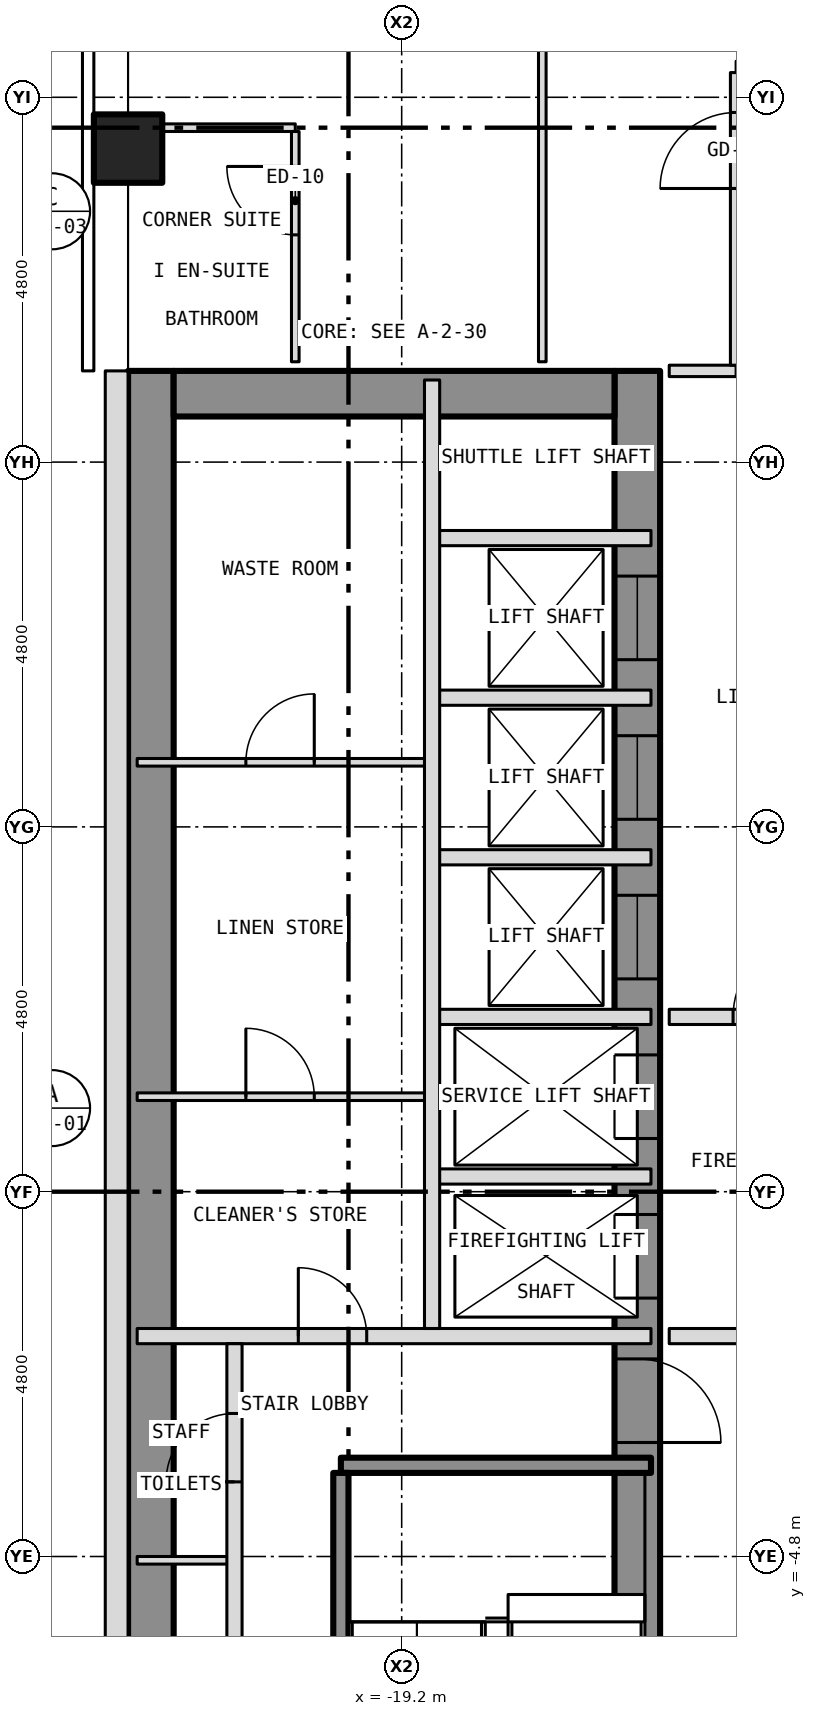
"""IFC4 building model, lengths in metres.
Left out: names, types, materials, properties, quantities, classifications, styles, units other than length and angle.
Written with IfcOpenShell. Run it as: python <this file> out.ifc"""

import sys

from ifc_helpers import new_model, si_unit, direction, frame, frame_2d, origin, origin_2d, place, context, subcontext, project, spatial, rectangle, hollow_rectangle, extrude, element, fill, save


model = new_model("IFC4")
c1 = context("Model", 3, precision=1e-05, world=origin(), true_north=direction((0.0, 1.0)))
c2 = subcontext(c1, "Body", "Model", "MODEL_VIEW")
j1 = project(units=[si_unit("LENGTHUNIT", "METRE"), si_unit("PLANEANGLEUNIT", "RADIAN")], contexts=[c1])
p1 = place(None, origin())
s1 = spatial("IfcSite", under=j1, at=p1, CompositionType="ELEMENT")
p2 = place(p1, origin())
s2 = spatial("IfcBuilding", under=s1, at=p2, CompositionType="ELEMENT")
p3 = place(p2, frame((0.0, 0.0, 110.0)))
s3 = spatial("IfcBuildingStorey", under=s2, at=p3, CompositionType="ELEMENT", Elevation=110.0)
p4 = place(p3, frame((-22.8, 13.725, -0.15), z_axis=(0.0, 0.0, 1.0), x_axis=(1.0, 0.0, 0.0)))
e1 = element("IfcColumn", 1, at=p4, inside=s3, PredefinedType="COLUMN", context=c2, shape_type="SweptSolid", body=[
    extrude(hollow_rectangle(XDim=0.9, YDim=0.9, WallThickness=0.05, at=origin_2d()), origin(), (0.0, 0.0, 1.0), 3.5),
])
p5 = place(p3, frame((-16.1, -10.8, 0.0), z_axis=(0.0, 0.0, 1.0), x_axis=(0.0, 1.0, 0.0)))
e2 = element("IfcWall", 2, at=p5, inside=s3, PredefinedType="SHEAR", context=c2, shape_type="SweptSolid", body=[
    extrude(rectangle(XDim=21.6, YDim=0.6, at=frame_2d((10.8, 0.0))), origin(), (0.0, 0.0, 1.0), 3.25),
])
p6 = place(p5, frame((9.4, 0.0, 0.0)))
e3 = element("IfcOpeningElement", 3, at=p6, cuts=e2, PredefinedType="OPENING", context=c2, shape_type="SweptSolid", body=[
    extrude(rectangle(XDim=1.1, YDim=2.1, at=frame_2d((0.55, 1.05))), frame((0.0, 0.312, 0.0), z_axis=(0.0, -1.0, 0.0), x_axis=(1.0, 0.0, 0.0)), (0.0, 0.0, 1.0), 0.624),
])
p7 = place(p5, frame((11.5, 0.0, 0.0)))
e4 = element("IfcOpeningElement", 4, at=p7, cuts=e2, PredefinedType="OPENING", context=c2, shape_type="SweptSolid", body=[
    extrude(rectangle(XDim=1.1, YDim=2.1, at=frame_2d((0.55, 1.05))), frame((0.0, 0.312, 0.0), z_axis=(0.0, -1.0, 0.0), x_axis=(1.0, 0.0, 0.0)), (0.0, 0.0, 1.0), 0.624),
])
p8 = place(p5, frame((13.6, 0.0, 0.0)))
e5 = element("IfcOpeningElement", 5, at=p8, cuts=e2, PredefinedType="OPENING", context=c2, shape_type="SweptSolid", body=[
    extrude(rectangle(XDim=1.1, YDim=2.1, at=frame_2d((0.55, 1.05))), frame((0.0, 0.312, 0.0), z_axis=(0.0, -1.0, 0.0), x_axis=(1.0, 0.0, 0.0)), (0.0, 0.0, 1.0), 0.624),
])
p9 = place(p5, frame((15.7, 0.0, 0.0)))
e6 = element("IfcOpeningElement", 6, at=p9, cuts=e2, PredefinedType="OPENING", context=c2, shape_type="SweptSolid", body=[
    extrude(rectangle(XDim=1.1, YDim=2.1, at=frame_2d((0.55, 1.05))), frame((0.0, 0.312, 0.0), z_axis=(0.0, -1.0, 0.0), x_axis=(1.0, 0.0, 0.0)), (0.0, 0.0, 1.0), 0.624),
])
p10 = place(p5, frame((17.8, 0.0, 0.0)))
e7 = element("IfcOpeningElement", 7, at=p10, cuts=e2, PredefinedType="OPENING", context=c2, shape_type="SweptSolid", body=[
    extrude(rectangle(XDim=1.1, YDim=2.1, at=frame_2d((0.55, 1.05))), frame((0.0, 0.312, 0.0), z_axis=(0.0, -1.0, 0.0), x_axis=(1.0, 0.0, 0.0)), (0.0, 0.0, 1.0), 0.624),
])
p11 = place(p5, frame((0.758, 0.0, 0.0)))
e8 = element("IfcOpeningElement", 8, at=p11, cuts=e2, PredefinedType="OPENING", context=c2, shape_type="SweptSolid", body=[
    extrude(rectangle(XDim=1.1, YDim=2.1, at=frame_2d((0.55, 1.05))), frame((0.0, 0.312, 0.0), z_axis=(0.0, -1.0, 0.0), x_axis=(1.0, 0.0, 0.0)), (0.0, 0.0, 1.0), 0.624),
])
p12 = place(p5, frame((7.5, 0.0, 0.0)))
e9 = element("IfcOpeningElement", 9, at=p12, cuts=e2, PredefinedType="OPENING", context=c2, shape_type="SweptSolid", body=[
    extrude(rectangle(XDim=1.1, YDim=2.1, at=frame_2d((0.55, 1.05))), frame((0.0, 0.312, 0.0), z_axis=(0.0, -1.0, 0.0), x_axis=(1.0, 0.0, 0.0)), (0.0, 0.0, 1.0), 0.624),
])
p13 = place(p3, frame((-22.5, -10.8, 0.0), z_axis=(0.0, 0.0, 1.0), x_axis=(0.0, 1.0, 0.0)))
e10 = element("IfcWall", 10, at=p13, inside=s3, PredefinedType="SHEAR", context=c2, shape_type="SweptSolid", body=[
    extrude(rectangle(XDim=21.6, YDim=0.6, at=frame_2d((10.8, 0.0))), origin(), (0.0, 0.0, 1.0), 3.25),
])
p14 = place(p3, frame((-22.2, 10.5, 0.0), z_axis=(0.0, 0.0, 1.0), x_axis=(1.0, 0.0, 0.0)))
e11 = element("IfcWall", 11, at=p14, inside=s3, PredefinedType="SHEAR", context=c2, shape_type="SweptSolid", body=[
    extrude(rectangle(XDim=5.8, YDim=0.6, at=frame_2d((2.9, 0.0))), origin(), (0.0, 0.0, 1.0), 3.25),
])
p15 = place(p3, frame((-22.95, 10.8, 0.0), z_axis=(0.0, 0.0, 1.0), x_axis=(0.0, -1.0, 0.0)))
e12 = element("IfcWall", 12, at=p15, inside=s3, PredefinedType="SOLIDWALL", context=c2, shape_type="SweptSolid", body=[
    extrude(rectangle(XDim=21.6, YDim=0.3, at=frame_2d((10.8, 0.0))), origin(), (0.0, 0.0, 1.0), 3.5),
])
p16 = place(p15, frame((18.05, 0.0, 1.0)))
e13 = element("IfcOpeningElement", 13, at=p16, cuts=e12, PredefinedType="OPENING", context=c2, shape_type="SweptSolid", body=[
    extrude(rectangle(XDim=0.6, YDim=1.5, at=frame_2d((0.3, 0.75))), frame((0.0, 0.162, 0.0), z_axis=(0.0, -1.0, 0.0), x_axis=(1.0, 0.0, 0.0)), (0.0, 0.0, 1.0), 0.324),
])
p17 = place(p3, frame((-22.68, -4.85, 0.0), z_axis=(0.0, 0.0, 1.0), x_axis=(1.0, 0.0, 0.0)))
e14 = element("IfcWall", 14, at=p17, inside=s3, PredefinedType="PARTITIONING", context=c2, shape_type="SweptSolid", body=[
    extrude(rectangle(XDim=1.28, YDim=0.1, at=frame_2d((0.64, 0.0))), origin(), (0.0, 0.0, 1.0), 3.25),
])
p18 = place(p3, frame((-20.0, -3.6, 0.0), z_axis=(0.0, 0.0, 1.0), x_axis=(1.0, 0.0, 0.0)))
e15 = element("IfcWall", 15, at=p18, inside=s3, PredefinedType="SHEAR", context=c2, shape_type="SweptSolid", body=[
    extrude(rectangle(XDim=4.08, YDim=0.2, at=frame_2d((2.04, 0.0))), origin(), (0.0, 0.0, 1.0), 3.25),
])
p19 = place(p3, frame((-22.68, -1.9, 0.0), z_axis=(0.0, 0.0, 1.0), x_axis=(1.0, 0.0, 0.0)))
e16 = element("IfcWall", 16, at=p19, inside=s3, PredefinedType="PARTITIONING", context=c2, shape_type="SweptSolid", body=[
    extrude(rectangle(XDim=6.76, YDim=0.2, at=frame_2d((3.38, 0.0))), origin(), (0.0, 0.0, 1.0), 3.25),
])
p20 = place(p19, frame((2.12, 0.0, 0.0)))
e17 = element("IfcOpeningElement", 17, at=p20, cuts=e16, PredefinedType="OPENING", context=c2, shape_type="SweptSolid", body=[
    extrude(rectangle(XDim=0.9, YDim=2.1, at=frame_2d((0.45, 1.05))), frame((0.0, 0.112, 0.0), z_axis=(0.0, -1.0, 0.0), x_axis=(1.0, 0.0, 0.0)), (0.0, 0.0, 1.0), 0.224),
])
p21 = place(p3, frame((-15.68, -1.9, 0.0), z_axis=(0.0, 0.0, 1.0), x_axis=(1.0, 0.0, 0.0)))
e18 = element("IfcWall", 18, at=p21, inside=s3, PredefinedType="PARTITIONING", context=c2, shape_type="SweptSolid", body=[
    extrude(rectangle(XDim=3.28, YDim=0.2, at=frame_2d((1.64, 0.0))), origin(), (0.0, 0.0, 1.0), 3.35),
])
p22 = place(p21, frame((0.94, 0.0, 0.0)))
e19 = element("IfcOpeningElement", 19, at=p22, cuts=e18, PredefinedType="OPENING", context=c2, shape_type="SweptSolid", body=[
    extrude(rectangle(XDim=1.1, YDim=2.1, at=frame_2d((0.55, 1.05))), frame((0.0, 0.112, 0.0), z_axis=(0.0, -1.0, 0.0), x_axis=(1.0, 0.0, 0.0)), (0.0, 0.0, 1.0), 0.224),
])
p23 = place(p3, frame((-18.8, 0.2, 0.0), z_axis=(0.0, 0.0, 1.0), x_axis=(1.0, 0.0, 0.0)))
e20 = element("IfcWall", 20, at=p23, inside=s3, PredefinedType="PARTITIONING", context=c2, shape_type="SweptSolid", body=[
    extrude(rectangle(XDim=2.88, YDim=0.2, at=frame_2d((1.44, 0.0))), origin(), (0.0, 0.0, 1.0), 3.25),
])
p24 = place(p3, frame((-22.68, 1.25, 0.0), z_axis=(0.0, 0.0, 1.0), x_axis=(1.0, 0.0, 0.0)))
e21 = element("IfcWall", 21, at=p24, inside=s3, PredefinedType="PARTITIONING", context=c2, shape_type="SweptSolid", body=[
    extrude(rectangle(XDim=3.88, YDim=0.1, at=frame_2d((1.94, 0.0))), origin(), (0.0, 0.0, 1.0), 3.25),
])
p25 = place(p24, frame((1.43, 0.0, 0.0)))
e22 = element("IfcOpeningElement", 22, at=p25, cuts=e21, PredefinedType="OPENING", context=c2, shape_type="SweptSolid", body=[
    extrude(rectangle(XDim=0.9, YDim=2.1, at=frame_2d((0.45, 1.05))), frame((0.0, 0.062, 0.0), z_axis=(0.0, -1.0, 0.0), x_axis=(1.0, 0.0, 0.0)), (0.0, 0.0, 1.0), 0.124),
])
p26 = place(p3, frame((-18.8, 2.3, 0.0), z_axis=(0.0, 0.0, 1.0), x_axis=(1.0, 0.0, 0.0)))
e23 = element("IfcWall", 23, at=p26, inside=s3, PredefinedType="PARTITIONING", context=c2, shape_type="SweptSolid", body=[
    extrude(rectangle(XDim=2.88, YDim=0.2, at=frame_2d((1.44, 0.0))), origin(), (0.0, 0.0, 1.0), 3.25),
])
p27 = place(p3, frame((-15.68, 2.3, 0.0), z_axis=(0.0, 0.0, 1.0), x_axis=(1.0, 0.0, 0.0)))
e24 = element("IfcWall", 24, at=p27, inside=s3, PredefinedType="PARTITIONING", context=c2, shape_type="SweptSolid", body=[
    extrude(rectangle(XDim=3.28, YDim=0.2, at=frame_2d((1.64, 0.0))), origin(), (0.0, 0.0, 1.0), 3.35),
])
p28 = place(p27, frame((0.84, 0.0, 0.0)))
e25 = element("IfcOpeningElement", 25, at=p28, cuts=e24, PredefinedType="OPENING", context=c2, shape_type="SweptSolid", body=[
    extrude(rectangle(XDim=1.1, YDim=2.1, at=frame_2d((0.55, 1.05))), frame((0.0, 0.112, 0.0), z_axis=(0.0, -1.0, 0.0), x_axis=(1.0, 0.0, 0.0)), (0.0, 0.0, 1.0), 0.224),
])
p29 = place(p3, frame((-18.8, 4.4, 0.0), z_axis=(0.0, 0.0, 1.0), x_axis=(1.0, 0.0, 0.0)))
e26 = element("IfcWall", 26, at=p29, inside=s3, PredefinedType="PARTITIONING", context=c2, shape_type="SweptSolid", body=[
    extrude(rectangle(XDim=2.88, YDim=0.2, at=frame_2d((1.44, 0.0))), origin(), (0.0, 0.0, 1.0), 3.25),
])
p30 = place(p3, frame((-22.68, 5.65, 0.0), z_axis=(0.0, 0.0, 1.0), x_axis=(1.0, 0.0, 0.0)))
e27 = element("IfcWall", 27, at=p30, inside=s3, PredefinedType="PARTITIONING", context=c2, shape_type="SweptSolid", body=[
    extrude(rectangle(XDim=3.88, YDim=0.1, at=frame_2d((1.94, 0.0))), origin(), (0.0, 0.0, 1.0), 3.25),
])
p31 = place(p30, frame((1.43, 0.0, 0.0)))
e28 = element("IfcOpeningElement", 28, at=p31, cuts=e27, PredefinedType="OPENING", context=c2, shape_type="SweptSolid", body=[
    extrude(rectangle(XDim=0.9, YDim=2.1, at=frame_2d((0.45, 1.05))), frame((0.0, 0.062, 0.0), z_axis=(0.0, -1.0, 0.0), x_axis=(1.0, 0.0, 0.0)), (0.0, 0.0, 1.0), 0.124),
])
for number, where, z_axis, x_axis in (
    (29, (-18.8, 6.5, 0.0), (0.0, 0.0, 1.0), (1.0, 0.0, 0.0)),
    (30, (-18.8, 8.6, 0.0), (0.0, 0.0, 1.0), (1.0, 0.0, 0.0)),
):
    element("IfcWall", number, at=place(p3, frame(where, z_axis=z_axis, x_axis=x_axis)), inside=s3, PredefinedType="PARTITIONING", context=c2, shape_type="SweptSolid", body=[
        extrude(rectangle(XDim=2.88, YDim=0.2, at=frame_2d((1.44, 0.0))), origin(), (0.0, 0.0, 1.0), 3.25),
    ])
p32 = place(p3, frame((-15.68, 10.8, 0.0), z_axis=(0.0, 0.0, 1.0), x_axis=(1.0, 0.0, 0.0)))
e31 = element("IfcWall", 31, at=p32, inside=s3, PredefinedType="PARTITIONING", context=c2, shape_type="SweptSolid", body=[
    extrude(rectangle(XDim=0.88, YDim=0.15, at=frame_2d((0.44, 0.0))), origin(), (0.0, 0.0, 1.0), 3.35),
])
p33 = place(p3, frame((-22.68, 14.0, 0.0), z_axis=(0.0, 0.0, 1.0), x_axis=(1.0, 0.0, 0.0)))
e32 = element("IfcWall", 32, at=p33, inside=s3, PredefinedType="PARTITIONING", context=c2, shape_type="SweptSolid", body=[
    extrude(rectangle(XDim=2.08, YDim=0.1, at=frame_2d((1.04, 0.0))), origin(), (0.0, 0.0, 1.0), 3.35),
])
p34 = place(p3, frame((-21.4, -10.68, 0.0), z_axis=(0.0, 0.0, 1.0), x_axis=(0.0, 1.0, 0.0)))
e33 = element("IfcWall", 33, at=p34, inside=s3, PredefinedType="PARTITIONING", context=c2, shape_type="SweptSolid", body=[
    extrude(rectangle(XDim=8.68, YDim=0.2, at=frame_2d((4.34, 0.0))), origin(), (0.0, 0.0, 1.0), 3.25),
])
p35 = place(p34, frame((0.899, 0.0, 0.0)))
e34 = element("IfcOpeningElement", 34, at=p35, cuts=e33, PredefinedType="OPENING", context=c2, shape_type="SweptSolid", body=[
    extrude(rectangle(XDim=0.9, YDim=2.1, at=frame_2d((0.45, 1.05))), frame((0.0, 0.112, 0.0), z_axis=(0.0, -1.0, 0.0), x_axis=(1.0, 0.0, 0.0)), (0.0, 0.0, 1.0), 0.224),
])
p36 = place(p34, frame((3.88, 0.0, 0.0)))
e35 = element("IfcOpeningElement", 35, at=p36, cuts=e33, PredefinedType="OPENING", context=c2, shape_type="SweptSolid", body=[
    extrude(rectangle(XDim=0.9, YDim=2.1, at=frame_2d((0.45, 1.05))), frame((0.0, 0.112, 0.0), z_axis=(0.0, -1.0, 0.0), x_axis=(1.0, 0.0, 0.0)), (0.0, 0.0, 1.0), 0.224),
])
p37 = place(p34, frame((6.862, 0.0, 0.0)))
e36 = element("IfcOpeningElement", 36, at=p37, cuts=e33, PredefinedType="OPENING", context=c2, shape_type="SweptSolid", body=[
    extrude(rectangle(XDim=0.9, YDim=2.1, at=frame_2d((0.45, 1.05))), frame((0.0, 0.112, 0.0), z_axis=(0.0, -1.0, 0.0), x_axis=(1.0, 0.0, 0.0)), (0.0, 0.0, 1.0), 0.224),
])
p38 = place(p3, frame((-20.6, 10.92, 0.0), z_axis=(0.0, 0.0, 1.0), x_axis=(0.0, 1.0, 0.0)))
e37 = element("IfcWall", 37, at=p38, inside=s3, PredefinedType="PARTITIONING", context=c2, shape_type="SweptSolid", body=[
    extrude(rectangle(XDim=3.03, YDim=0.1, at=frame_2d((1.515, 0.0))), origin(), (0.0, 0.0, 1.0), 3.35),
])
p39 = place(p38, frame((1.67, 0.0, 0.0)))
e38 = element("IfcOpeningElement", 38, at=p39, cuts=e37, PredefinedType="OPENING", context=c2, shape_type="SweptSolid", body=[
    extrude(rectangle(XDim=0.9, YDim=2.1, at=frame_2d((0.45, 1.05))), frame((0.0, 0.062, 0.0), z_axis=(0.0, -1.0, 0.0), x_axis=(1.0, 0.0, 0.0)), (0.0, 0.0, 1.0), 0.124),
])
p40 = place(p3, frame((-20.0, -10.68, 0.0), z_axis=(0.0, 0.0, 1.0), x_axis=(0.0, 1.0, 0.0)))
e39 = element("IfcWall", 39, at=p40, inside=s3, PredefinedType="SHEAR", context=c2, shape_type="SweptSolid", body=[
    extrude(rectangle(XDim=6.98, YDim=0.2, at=frame_2d((3.49, 0.0))), origin(), (0.0, 0.0, 1.0), 3.25),
])
p41 = place(p3, frame((-18.8, -1.8, 0.0), z_axis=(0.0, 0.0, 1.0), x_axis=(0.0, 1.0, 0.0)))
e40 = element("IfcWall", 40, at=p41, inside=s3, PredefinedType="PARTITIONING", context=c2, shape_type="SweptSolid", body=[
    extrude(rectangle(XDim=12.48, YDim=0.2, at=frame_2d((6.24, 0.0))), origin(), (0.0, 0.0, 1.0), 3.25),
])
p42 = place(p3, frame((-17.35, 10.92, 0.0), z_axis=(0.0, 0.0, 1.0), x_axis=(0.0, 1.0, 0.0)))
e41 = element("IfcWall", 41, at=p42, inside=s3, PredefinedType="PARTITIONING", context=c2, shape_type="SweptSolid", body=[
    extrude(rectangle(XDim=12.36, YDim=0.1, at=frame_2d((6.18, 0.0))), origin(), (0.0, 0.0, 1.0), 3.35),
])
p43 = place(p42, frame((5.43, 0.0, 0.0)))
e42 = element("IfcOpeningElement", 42, at=p43, cuts=e41, PredefinedType="OPENING", context=c2, shape_type="SweptSolid", body=[
    extrude(rectangle(XDim=0.9, YDim=2.1, at=frame_2d((0.45, 1.05))), frame((0.0, 0.062, 0.0), z_axis=(0.0, -1.0, 0.0), x_axis=(1.0, 0.0, 0.0)), (0.0, 0.0, 1.0), 0.124),
])
p44 = place(p3, frame((-14.8, 10.875, 0.0), z_axis=(0.0, 0.0, 1.0), x_axis=(0.0, 1.0, 0.0)))
e43 = element("IfcWall", 43, at=p44, inside=s3, PredefinedType="PARTITIONING", context=c2, shape_type="SweptSolid", body=[
    extrude(rectangle(XDim=3.85, YDim=0.15, at=frame_2d((1.925, 0.0))), origin(), (0.0, 0.0, 1.0), 3.35),
])
p45 = place(p44, frame((2.325, 0.0, 0.0)))
e44 = element("IfcOpeningElement", 44, at=p45, cuts=e43, PredefinedType="OPENING", context=c2, shape_type="SweptSolid", body=[
    extrude(rectangle(XDim=1.0, YDim=2.1, at=frame_2d((0.5, 1.05))), frame((0.0, 0.087, 0.0), z_axis=(0.0, -1.0, 0.0), x_axis=(1.0, 0.0, 0.0)), (0.0, 0.0, 1.0), 0.174),
])
p46 = place(p6, origin())
e45 = element("IfcDoor", 45, at=p46, inside=s3, OperationType="SLIDING_TO_LEFT", PredefinedType="DOOR", context=c2, shape_type="SweptSolid", body=[
    extrude(rectangle(XDim=1.1, YDim=2.1, at=frame_2d((0.55, 1.05))), frame((0.0, 0.025, 0.0), z_axis=(0.0, -1.0, 0.0), x_axis=(1.0, 0.0, 0.0)), (0.0, 0.0, 1.0), 0.05),
])
fill(e3, e45)
p47 = place(p7, origin())
e46 = element("IfcDoor", 46, at=p47, inside=s3, OperationType="SLIDING_TO_LEFT", PredefinedType="DOOR", context=c2, shape_type="SweptSolid", body=[
    extrude(rectangle(XDim=1.1, YDim=2.1, at=frame_2d((0.55, 1.05))), frame((0.0, 0.025, 0.0), z_axis=(0.0, -1.0, 0.0), x_axis=(1.0, 0.0, 0.0)), (0.0, 0.0, 1.0), 0.05),
])
fill(e4, e46)
p48 = place(p8, origin())
e47 = element("IfcDoor", 47, at=p48, inside=s3, OperationType="SLIDING_TO_LEFT", PredefinedType="DOOR", context=c2, shape_type="SweptSolid", body=[
    extrude(rectangle(XDim=1.1, YDim=2.1, at=frame_2d((0.55, 1.05))), frame((0.0, 0.025, 0.0), z_axis=(0.0, -1.0, 0.0), x_axis=(1.0, 0.0, 0.0)), (0.0, 0.0, 1.0), 0.05),
])
fill(e5, e47)
p49 = place(p9, origin())
e48 = element("IfcDoor", 48, at=p49, inside=s3, OperationType="SLIDING_TO_LEFT", PredefinedType="DOOR", context=c2, shape_type="SweptSolid", body=[
    extrude(rectangle(XDim=1.1, YDim=2.1, at=frame_2d((0.55, 1.05))), frame((0.0, 0.025, 0.0), z_axis=(0.0, -1.0, 0.0), x_axis=(1.0, 0.0, 0.0)), (0.0, 0.0, 1.0), 0.05),
])
fill(e6, e48)
p50 = place(p10, origin())
e49 = element("IfcDoor", 49, at=p50, inside=s3, OperationType="SLIDING_TO_LEFT", PredefinedType="DOOR", context=c2, shape_type="SweptSolid", body=[
    extrude(rectangle(XDim=1.1, YDim=2.1, at=frame_2d((0.55, 1.05))), frame((0.0, 0.025, 0.0), z_axis=(0.0, -1.0, 0.0), x_axis=(1.0, 0.0, 0.0)), (0.0, 0.0, 1.0), 0.05),
])
fill(e7, e49)
p51 = place(p12, origin())
e50 = element("IfcDoor", 50, at=p51, inside=s3, OperationType="SINGLE_SWING_LEFT", PredefinedType="DOOR", context=c2, shape_type="SweptSolid", body=[
    extrude(rectangle(XDim=1.1, YDim=2.1, at=frame_2d((0.55, 1.05))), frame((0.0, 0.025, 0.0), z_axis=(0.0, -1.0, 0.0), x_axis=(1.0, 0.0, 0.0)), (0.0, 0.0, 1.0), 0.05),
])
fill(e9, e50)
p52 = place(p37, origin())
e51 = element("IfcDoor", 51, at=p52, inside=s3, OperationType="SINGLE_SWING_LEFT", PredefinedType="DOOR", context=c2, shape_type="SweptSolid", body=[
    extrude(rectangle(XDim=0.9, YDim=2.1, at=frame_2d((0.45, 1.05))), frame((0.0, 0.025, 0.0), z_axis=(0.0, -1.0, 0.0), x_axis=(1.0, 0.0, 0.0)), (0.0, 0.0, 1.0), 0.05),
])
fill(e36, e51)
p53 = place(p20, origin())
e52 = element("IfcDoor", 52, at=p53, inside=s3, OperationType="SINGLE_SWING_LEFT", PredefinedType="DOOR", context=c2, shape_type="SweptSolid", body=[
    extrude(rectangle(XDim=0.9, YDim=2.1, at=frame_2d((0.45, 1.05))), frame((0.0, 0.025, 0.0), z_axis=(0.0, -1.0, 0.0), x_axis=(1.0, 0.0, 0.0)), (0.0, 0.0, 1.0), 0.05),
])
fill(e17, e52)
p54 = place(p25, origin())
e53 = element("IfcDoor", 53, at=p54, inside=s3, OperationType="SINGLE_SWING_LEFT", PredefinedType="DOOR", context=c2, shape_type="SweptSolid", body=[
    extrude(rectangle(XDim=0.9, YDim=2.1, at=frame_2d((0.45, 1.05))), frame((0.0, 0.025, 0.0), z_axis=(0.0, -1.0, 0.0), x_axis=(1.0, 0.0, 0.0)), (0.0, 0.0, 1.0), 0.05),
])
fill(e22, e53)
p55 = place(p31, origin())
e54 = element("IfcDoor", 54, at=p55, inside=s3, OperationType="SINGLE_SWING_RIGHT", PredefinedType="DOOR", context=c2, shape_type="SweptSolid", body=[
    extrude(rectangle(XDim=0.9, YDim=2.1, at=frame_2d((0.45, 1.05))), frame((0.0, 0.025, 0.0), z_axis=(0.0, -1.0, 0.0), x_axis=(1.0, 0.0, 0.0)), (0.0, 0.0, 1.0), 0.05),
])
fill(e28, e54)
p56 = place(p28, origin())
e55 = element("IfcDoor", 55, at=p56, inside=s3, OperationType="SINGLE_SWING_RIGHT", PredefinedType="DOOR", context=c2, shape_type="SweptSolid", body=[
    extrude(rectangle(XDim=1.1, YDim=2.1, at=frame_2d((0.55, 1.05))), frame((0.0, 0.025, 0.0), z_axis=(0.0, -1.0, 0.0), x_axis=(1.0, 0.0, 0.0)), (0.0, 0.0, 1.0), 0.05),
])
fill(e25, e55)
p57 = place(p45, origin())
e56 = element("IfcDoor", 56, at=p57, inside=s3, OperationType="SINGLE_SWING_LEFT", PredefinedType="DOOR", context=c2, shape_type="SweptSolid", body=[
    extrude(rectangle(XDim=1.0, YDim=2.1, at=frame_2d((0.5, 1.05))), frame((0.0, 0.025, 0.0), z_axis=(0.0, -1.0, 0.0), x_axis=(1.0, 0.0, 0.0)), (0.0, 0.0, 1.0), 0.05),
])
fill(e44, e56)
p58 = place(p39, origin())
e57 = element("IfcDoor", 57, at=p58, inside=s3, OperationType="SINGLE_SWING_RIGHT", PredefinedType="DOOR", context=c2, shape_type="SweptSolid", body=[
    extrude(rectangle(XDim=0.9, YDim=2.1, at=frame_2d((0.45, 1.05))), frame((0.0, 0.025, 0.0), z_axis=(0.0, -1.0, 0.0), x_axis=(1.0, 0.0, 0.0)), (0.0, 0.0, 1.0), 0.05),
])
fill(e38, e57)
save(model, sys.argv[1])
